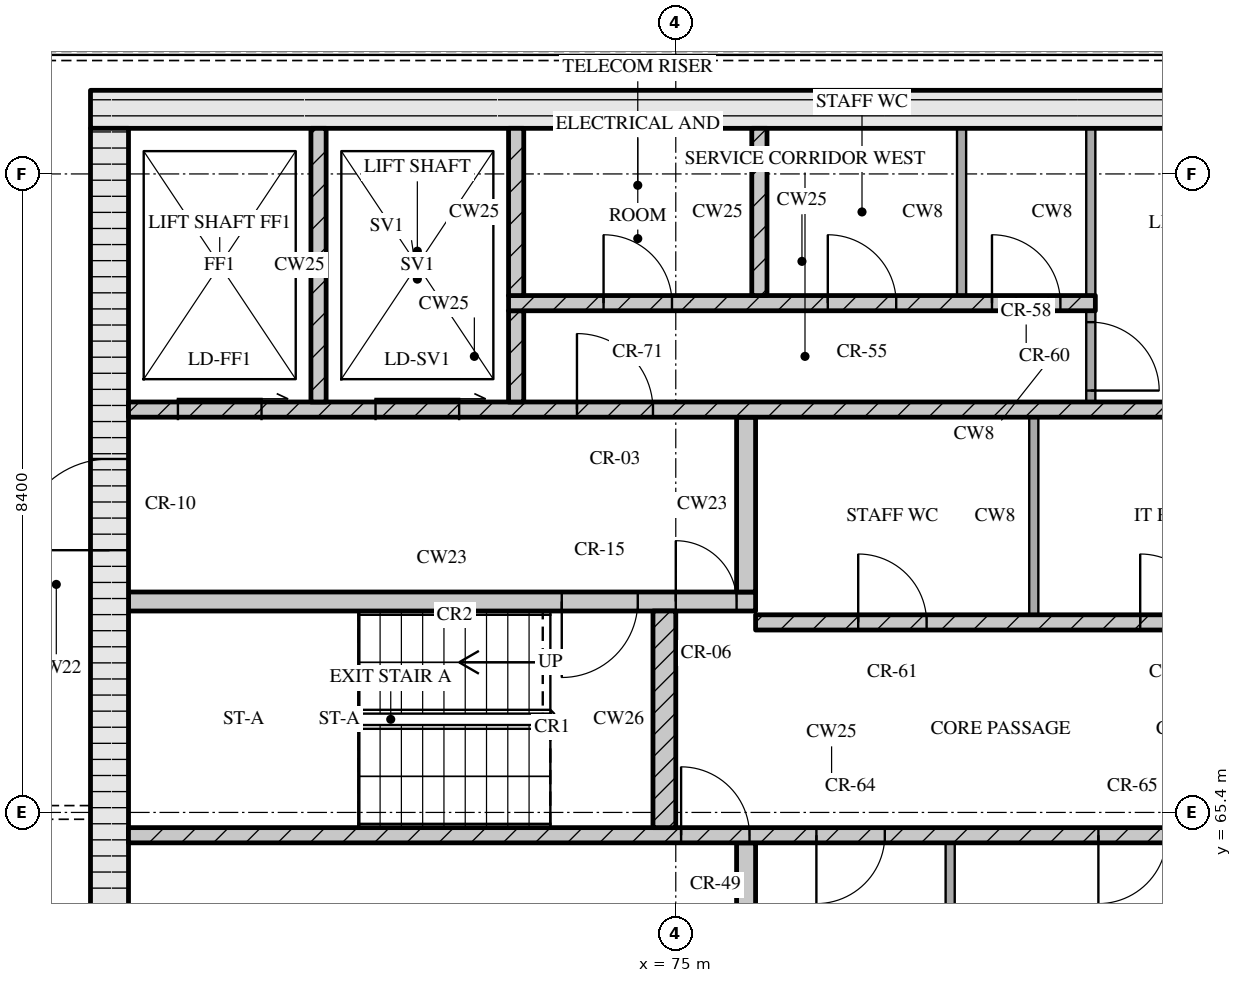
"""IFC4 building model, lengths in metres.
Left out: names, types, materials, properties, quantities, classifications, styles, units other than length and angle.
Written with IfcOpenShell. Run it as: python <this file> out.ifc"""

import sys

from ifc_helpers import new_model, si_unit, direction, frame, frame_2d, origin, place, context, subcontext, project, spatial, rectangle, extrude, element, fill, save


model = new_model("IFC4")
c1 = context("Model", 3, precision=1e-05, world=origin(), true_north=direction((0.0, 1.0)))
c2 = subcontext(c1, "Body", "Model", "MODEL_VIEW")
j1 = project(units=[si_unit("LENGTHUNIT", "METRE"), si_unit("PLANEANGLEUNIT", "RADIAN")], contexts=[c1])
p1 = place(None, origin())
s1 = spatial("IfcSite", under=j1, at=p1, CompositionType="ELEMENT")
p2 = place(p1, origin())
s2 = spatial("IfcBuilding", under=s1, at=p2, CompositionType="ELEMENT")
p3 = place(p2, frame((0.0, 0.0, 274.35)))
s3 = spatial("IfcBuildingStorey", under=s2, at=p3, CompositionType="ELEMENT", Elevation=274.35)
p4 = place(p3, frame((67.3, 74.65, 0.0), z_axis=(0.0, 0.0, 1.0), x_axis=(1.0, 0.0, 0.0)))
e1 = element("IfcWall", 1, at=p4, inside=s3, PredefinedType="SOLIDWALL", context=c2, shape_type="SweptSolid", body=[
    extrude(rectangle(XDim=40.6, YDim=0.5, at=frame_2d((20.3, 0.0))), origin(), (0.0, 0.0, 1.0), 3.32),
])
p5 = place(p3, frame((67.55, 62.4, 0.0), z_axis=(0.0, 0.0, 1.0), x_axis=(0.0, 1.0, 0.0)))
e2 = element("IfcWall", 2, at=p5, inside=s3, PredefinedType="SOLIDWALL", context=c2, shape_type="SweptSolid", body=[
    extrude(rectangle(XDim=12.0, YDim=0.5, at=frame_2d((6.0, 0.0))), origin(), (0.0, 0.0, 1.0), 3.32),
])
p6 = place(p5, frame((6.45, 0.0, 0.0)))
e3 = element("IfcOpeningElement", 3, at=p6, cuts=e2, PredefinedType="OPENING", context=c2, shape_type="SweptSolid", body=[
    extrude(rectangle(XDim=1.2, YDim=2.1, at=frame_2d((0.6, 1.05))), frame((0.0, 0.26, 0.0), z_axis=(0.0, -1.0, 0.0), x_axis=(1.0, 0.0, 0.0)), (0.0, 0.0, 1.0), 0.52),
])
p7 = place(p3, frame((75.925, 62.4, 0.0), z_axis=(0.0, 0.0, 1.0), x_axis=(0.0, 1.0, 0.0)))
e4 = element("IfcWall", 4, at=p7, inside=s3, PredefinedType="SOLIDWALL", context=c2, shape_type="SweptSolid", body=[
    extrude(rectangle(XDim=2.6, YDim=0.25, at=frame_2d((1.3, 0.0))), origin(), (0.0, 0.0, 1.0), 3.32),
])
p8 = place(p3, frame((78.61, 62.4, 0.0), z_axis=(0.0, 0.0, 1.0), x_axis=(0.0, 1.0, 0.0)))
e5 = element("IfcWall", 5, at=p8, inside=s3, PredefinedType="PARTITIONING", context=c2, shape_type="SweptSolid", body=[
    extrude(rectangle(XDim=2.6, YDim=0.12, at=frame_2d((1.3, 0.0))), origin(), (0.0, 0.0, 1.0), 3.32),
])
p9 = place(p3, frame((67.8, 65.1, 0.0), z_axis=(0.0, 0.0, 1.0), x_axis=(1.0, 0.0, 0.0)))
e6 = element("IfcWall", 6, at=p9, inside=s3, PredefinedType="SOLIDWALL", context=c2, shape_type="SweptSolid", body=[
    extrude(rectangle(XDim=18.5, YDim=0.2, at=frame_2d((9.25, 0.0))), origin(), (0.0, 0.0, 1.0), 3.32),
])
p10 = place(p9, frame((7.27, 0.0, 0.0)))
e7 = element("IfcOpeningElement", 7, at=p10, cuts=e6, PredefinedType="OPENING", context=c2, shape_type="SweptSolid", body=[
    extrude(rectangle(XDim=0.9, YDim=2.1, at=frame_2d((0.45, 1.05))), frame((0.0, 0.11, 0.0), z_axis=(0.0, -1.0, 0.0), x_axis=(1.0, 0.0, 0.0)), (0.0, 0.0, 1.0), 0.22),
])
p11 = place(p9, frame((9.05, 0.0, 0.0)))
e8 = element("IfcOpeningElement", 8, at=p11, cuts=e6, PredefinedType="OPENING", context=c2, shape_type="SweptSolid", body=[
    extrude(rectangle(XDim=0.9, YDim=2.1, at=frame_2d((0.45, 1.05))), frame((0.0, 0.11, 0.0), z_axis=(0.0, -1.0, 0.0), x_axis=(1.0, 0.0, 0.0)), (0.0, 0.0, 1.0), 0.22),
])
p12 = place(p9, frame((12.76, 0.0, 0.0)))
e9 = element("IfcOpeningElement", 9, at=p12, cuts=e6, PredefinedType="OPENING", context=c2, shape_type="SweptSolid", body=[
    extrude(rectangle(XDim=0.9, YDim=2.1, at=frame_2d((0.45, 1.05))), frame((0.0, 0.11, 0.0), z_axis=(0.0, -1.0, 0.0), x_axis=(1.0, 0.0, 0.0)), (0.0, 0.0, 1.0), 0.22),
])
p13 = place(p9, frame((16.7, 0.0, 0.0)))
e10 = element("IfcOpeningElement", 10, at=p13, cuts=e6, PredefinedType="OPENING", context=c2, shape_type="SweptSolid", body=[
    extrude(rectangle(XDim=0.9, YDim=2.1, at=frame_2d((0.45, 1.05))), frame((0.0, 0.11, 0.0), z_axis=(0.0, -1.0, 0.0), x_axis=(1.0, 0.0, 0.0)), (0.0, 0.0, 1.0), 0.22),
])
p14 = place(p3, frame((74.85, 65.2, 0.0), z_axis=(0.0, 0.0, 1.0), x_axis=(0.0, 1.0, 0.0)))
e11 = element("IfcWall", 11, at=p14, inside=s3, PredefinedType="SOLIDWALL", context=c2, shape_type="SweptSolid", body=[
    extrude(rectangle(XDim=2.85, YDim=0.3, at=frame_2d((1.425, 0.0))), origin(), (0.0, 0.0, 1.0), 3.32),
])
p15 = place(p3, frame((76.05, 67.9, 0.0), z_axis=(0.0, 0.0, 1.0), x_axis=(1.0, 0.0, 0.0)))
e12 = element("IfcWall", 12, at=p15, inside=s3, PredefinedType="SOLIDWALL", context=c2, shape_type="SweptSolid", body=[
    extrude(rectangle(XDim=23.1, YDim=0.2, at=frame_2d((11.55, 0.0))), origin(), (0.0, 0.0, 1.0), 3.32),
])
p16 = place(p15, frame((1.35, 0.0, 0.0)))
e13 = element("IfcOpeningElement", 13, at=p16, cuts=e12, PredefinedType="OPENING", context=c2, shape_type="SweptSolid", body=[
    extrude(rectangle(XDim=0.9, YDim=2.1, at=frame_2d((0.45, 1.05))), frame((0.0, 0.11, 0.0), z_axis=(0.0, -1.0, 0.0), x_axis=(1.0, 0.0, 0.0)), (0.0, 0.0, 1.0), 0.22),
])
p17 = place(p15, frame((5.06, 0.0, 0.0)))
e14 = element("IfcOpeningElement", 14, at=p17, cuts=e12, PredefinedType="OPENING", context=c2, shape_type="SweptSolid", body=[
    extrude(rectangle(XDim=0.9, YDim=2.1, at=frame_2d((0.45, 1.05))), frame((0.0, 0.11, 0.0), z_axis=(0.0, -1.0, 0.0), x_axis=(1.0, 0.0, 0.0)), (0.0, 0.0, 1.0), 0.22),
])
p18 = place(p15, frame((8.45, 0.0, 0.0)))
e15 = element("IfcOpeningElement", 15, at=p18, cuts=e12, PredefinedType="OPENING", context=c2, shape_type="SweptSolid", body=[
    extrude(rectangle(XDim=0.9, YDim=2.1, at=frame_2d((0.45, 1.05))), frame((0.0, 0.11, 0.0), z_axis=(0.0, -1.0, 0.0), x_axis=(1.0, 0.0, 0.0)), (0.0, 0.0, 1.0), 0.22),
])
p19 = place(p15, frame((10.91, 0.0, 0.0)))
e16 = element("IfcOpeningElement", 16, at=p19, cuts=e12, PredefinedType="OPENING", context=c2, shape_type="SweptSolid", body=[
    extrude(rectangle(XDim=0.9, YDim=2.1, at=frame_2d((0.45, 1.05))), frame((0.0, 0.11, 0.0), z_axis=(0.0, -1.0, 0.0), x_axis=(1.0, 0.0, 0.0)), (0.0, 0.0, 1.0), 0.22),
])
p20 = place(p15, frame((13.55, 0.0, 0.0)))
e17 = element("IfcOpeningElement", 17, at=p20, cuts=e12, PredefinedType="OPENING", context=c2, shape_type="SweptSolid", body=[
    extrude(rectangle(XDim=1.0, YDim=2.1, at=frame_2d((0.5, 1.05))), frame((0.0, 0.11, 0.0), z_axis=(0.0, -1.0, 0.0), x_axis=(1.0, 0.0, 0.0)), (0.0, 0.0, 1.0), 0.22),
])
p21 = place(p15, frame((16.2, 0.0, 0.0)))
e18 = element("IfcOpeningElement", 18, at=p21, cuts=e12, PredefinedType="OPENING", context=c2, shape_type="SweptSolid", body=[
    extrude(rectangle(XDim=1.1, YDim=2.1, at=frame_2d((0.55, 1.05))), frame((0.0, 0.11, 0.0), z_axis=(0.0, -1.0, 0.0), x_axis=(1.0, 0.0, 0.0)), (0.0, 0.0, 1.0), 0.22),
])
p22 = place(p15, frame((18.7, 0.0, 0.0)))
e19 = element("IfcOpeningElement", 19, at=p22, cuts=e12, PredefinedType="OPENING", context=c2, shape_type="SweptSolid", body=[
    extrude(rectangle(XDim=1.1, YDim=2.1, at=frame_2d((0.55, 1.05))), frame((0.0, 0.11, 0.0), z_axis=(0.0, -1.0, 0.0), x_axis=(1.0, 0.0, 0.0)), (0.0, 0.0, 1.0), 0.22),
])
p23 = place(p15, frame((21.2, 0.0, 0.0)))
e20 = element("IfcOpeningElement", 20, at=p23, cuts=e12, PredefinedType="OPENING", context=c2, shape_type="SweptSolid", body=[
    extrude(rectangle(XDim=1.1, YDim=2.1, at=frame_2d((0.55, 1.05))), frame((0.0, 0.11, 0.0), z_axis=(0.0, -1.0, 0.0), x_axis=(1.0, 0.0, 0.0)), (0.0, 0.0, 1.0), 0.22),
])
p24 = place(p3, frame((79.71, 68.0, 0.0), z_axis=(0.0, 0.0, 1.0), x_axis=(0.0, 1.0, 0.0)))
e21 = element("IfcWall", 21, at=p24, inside=s3, PredefinedType="PARTITIONING", context=c2, shape_type="SweptSolid", body=[
    extrude(rectangle(XDim=2.6, YDim=0.12, at=frame_2d((1.3, 0.0))), origin(), (0.0, 0.0, 1.0), 3.32),
])
p25 = place(p3, frame((67.8, 68.175, 0.0), z_axis=(0.0, 0.0, 1.0), x_axis=(1.0, 0.0, 0.0)))
e22 = element("IfcWall", 22, at=p25, inside=s3, PredefinedType="SOLIDWALL", context=c2, shape_type="SweptSolid", body=[
    extrude(rectangle(XDim=8.25, YDim=0.25, at=frame_2d((4.125, 0.0))), origin(), (0.0, 0.0, 1.0), 3.32),
])
p26 = place(p25, frame((5.7, 0.0, 0.0)))
e23 = element("IfcOpeningElement", 23, at=p26, cuts=e22, PredefinedType="OPENING", context=c2, shape_type="SweptSolid", body=[
    extrude(rectangle(XDim=1.0, YDim=2.1, at=frame_2d((0.5, 1.05))), frame((0.0, 0.135, 0.0), z_axis=(0.0, -1.0, 0.0), x_axis=(1.0, 0.0, 0.0)), (0.0, 0.0, 1.0), 0.27),
])
p27 = place(p25, frame((7.2, 0.0, 0.0)))
e24 = element("IfcOpeningElement", 24, at=p27, cuts=e22, PredefinedType="OPENING", context=c2, shape_type="SweptSolid", body=[
    extrude(rectangle(XDim=0.8, YDim=2.1, at=frame_2d((0.4, 1.05))), frame((0.0, 0.135, 0.0), z_axis=(0.0, -1.0, 0.0), x_axis=(1.0, 0.0, 0.0)), (0.0, 0.0, 1.0), 0.27),
])
p28 = place(p3, frame((75.925, 68.3, 0.0), z_axis=(0.0, 0.0, 1.0), x_axis=(0.0, 1.0, 0.0)))
e25 = element("IfcWall", 25, at=p28, inside=s3, PredefinedType="SOLIDWALL", context=c2, shape_type="SweptSolid", body=[
    extrude(rectangle(XDim=2.3, YDim=0.25, at=frame_2d((1.15, 0.0))), origin(), (0.0, 0.0, 1.0), 3.32),
])
p29 = place(p3, frame((67.8, 70.7, 0.0), z_axis=(0.0, 0.0, 1.0), x_axis=(1.0, 0.0, 0.0)))
e26 = element("IfcWall", 26, at=p29, inside=s3, PredefinedType="SOLIDWALL", context=c2, shape_type="SweptSolid", body=[
    extrude(rectangle(XDim=39.6, YDim=0.2, at=frame_2d((19.8, 0.0))), origin(), (0.0, 0.0, 1.0), 3.32),
])
p30 = place(p29, frame((0.65, 0.0, 0.0)))
e27 = element("IfcOpeningElement", 27, at=p30, cuts=e26, PredefinedType="OPENING", context=c2, shape_type="SweptSolid", body=[
    extrude(rectangle(XDim=1.1, YDim=2.1, at=frame_2d((0.55, 1.05))), frame((0.0, 0.11, 0.0), z_axis=(0.0, -1.0, 0.0), x_axis=(1.0, 0.0, 0.0)), (0.0, 0.0, 1.0), 0.22),
])
p31 = place(p29, frame((3.25, 0.0, 0.0)))
e28 = element("IfcOpeningElement", 28, at=p31, cuts=e26, PredefinedType="OPENING", context=c2, shape_type="SweptSolid", body=[
    extrude(rectangle(XDim=1.1, YDim=2.1, at=frame_2d((0.55, 1.05))), frame((0.0, 0.11, 0.0), z_axis=(0.0, -1.0, 0.0), x_axis=(1.0, 0.0, 0.0)), (0.0, 0.0, 1.0), 0.22),
])
p32 = place(p29, frame((5.9, 0.0, 0.0)))
e29 = element("IfcOpeningElement", 29, at=p32, cuts=e26, PredefinedType="OPENING", context=c2, shape_type="SweptSolid", body=[
    extrude(rectangle(XDim=1.0, YDim=2.1, at=frame_2d((0.5, 1.05))), frame((0.0, 0.11, 0.0), z_axis=(0.0, -1.0, 0.0), x_axis=(1.0, 0.0, 0.0)), (0.0, 0.0, 1.0), 0.22),
])
p33 = place(p29, frame((21.7, 0.0, 0.0)))
e30 = element("IfcOpeningElement", 30, at=p33, cuts=e26, PredefinedType="OPENING", context=c2, shape_type="SweptSolid", body=[
    extrude(rectangle(XDim=1.0, YDim=2.1, at=frame_2d((0.5, 1.05))), frame((0.0, 0.11, 0.0), z_axis=(0.0, -1.0, 0.0), x_axis=(1.0, 0.0, 0.0)), (0.0, 0.0, 1.0), 0.22),
])
p34 = place(p29, frame((32.7, 0.0, 0.0)))
e31 = element("IfcOpeningElement", 31, at=p34, cuts=e26, PredefinedType="OPENING", context=c2, shape_type="SweptSolid", body=[
    extrude(rectangle(XDim=1.0, YDim=2.1, at=frame_2d((0.5, 1.05))), frame((0.0, 0.11, 0.0), z_axis=(0.0, -1.0, 0.0), x_axis=(1.0, 0.0, 0.0)), (0.0, 0.0, 1.0), 0.22),
])
p35 = place(p29, frame((35.25, 0.0, 0.0)))
e32 = element("IfcOpeningElement", 32, at=p35, cuts=e26, PredefinedType="OPENING", context=c2, shape_type="SweptSolid", body=[
    extrude(rectangle(XDim=1.1, YDim=2.1, at=frame_2d((0.55, 1.05))), frame((0.0, 0.11, 0.0), z_axis=(0.0, -1.0, 0.0), x_axis=(1.0, 0.0, 0.0)), (0.0, 0.0, 1.0), 0.22),
])
p36 = place(p29, frame((37.85, 0.0, 0.0)))
e33 = element("IfcOpeningElement", 33, at=p36, cuts=e26, PredefinedType="OPENING", context=c2, shape_type="SweptSolid", body=[
    extrude(rectangle(XDim=1.1, YDim=2.1, at=frame_2d((0.55, 1.05))), frame((0.0, 0.11, 0.0), z_axis=(0.0, -1.0, 0.0), x_axis=(1.0, 0.0, 0.0)), (0.0, 0.0, 1.0), 0.22),
])
p37 = place(p3, frame((70.3, 70.8, 0.0), z_axis=(0.0, 0.0, 1.0), x_axis=(0.0, 1.0, 0.0)))
e34 = element("IfcWall", 34, at=p37, inside=s3, PredefinedType="SOLIDWALL", context=c2, shape_type="SweptSolid", body=[
    extrude(rectangle(XDim=3.6, YDim=0.2, at=frame_2d((1.8, 0.0))), origin(), (0.0, 0.0, 1.0), 3.32),
])
p38 = place(p3, frame((72.9, 70.8, 0.0), z_axis=(0.0, 0.0, 1.0), x_axis=(0.0, 1.0, 0.0)))
e35 = element("IfcWall", 35, at=p38, inside=s3, PredefinedType="SOLIDWALL", context=c2, shape_type="SweptSolid", body=[
    extrude(rectangle(XDim=1.2, YDim=0.2, at=frame_2d((0.6, 0.0))), origin(), (0.0, 0.0, 1.0), 3.32),
])
p39 = place(p3, frame((80.46, 70.8, 0.0), z_axis=(0.0, 0.0, 1.0), x_axis=(0.0, 1.0, 0.0)))
e36 = element("IfcWall", 36, at=p39, inside=s3, PredefinedType="PARTITIONING", context=c2, shape_type="SweptSolid", body=[
    extrude(rectangle(XDim=1.2, YDim=0.12, at=frame_2d((0.6, 0.0))), origin(), (0.0, 0.0, 1.0), 3.32),
])
p40 = place(p39, frame((0.15, 0.0, 0.0)))
e37 = element("IfcOpeningElement", 37, at=p40, cuts=e36, PredefinedType="OPENING", context=c2, shape_type="SweptSolid", body=[
    extrude(rectangle(XDim=0.9, YDim=2.1, at=frame_2d((0.45, 1.05))), frame((0.0, 0.07, 0.0), z_axis=(0.0, -1.0, 0.0), x_axis=(1.0, 0.0, 0.0)), (0.0, 0.0, 1.0), 0.14),
])
p41 = place(p3, frame((72.8, 72.1, 0.0), z_axis=(0.0, 0.0, 1.0), x_axis=(1.0, 0.0, 0.0)))
e38 = element("IfcWall", 38, at=p41, inside=s3, PredefinedType="SOLIDWALL", context=c2, shape_type="SweptSolid", body=[
    extrude(rectangle(XDim=7.72, YDim=0.2, at=frame_2d((3.86, 0.0))), origin(), (0.0, 0.0, 1.0), 3.32),
])
p42 = place(p41, frame((1.25, 0.0, 0.0)))
e39 = element("IfcOpeningElement", 39, at=p42, cuts=e38, PredefinedType="OPENING", context=c2, shape_type="SweptSolid", body=[
    extrude(rectangle(XDim=0.9, YDim=2.1, at=frame_2d((0.45, 1.05))), frame((0.0, 0.11, 0.0), z_axis=(0.0, -1.0, 0.0), x_axis=(1.0, 0.0, 0.0)), (0.0, 0.0, 1.0), 0.22),
])
p43 = place(p41, frame((4.2, 0.0, 0.0)))
e40 = element("IfcOpeningElement", 40, at=p43, cuts=e38, PredefinedType="OPENING", context=c2, shape_type="SweptSolid", body=[
    extrude(rectangle(XDim=0.9, YDim=2.1, at=frame_2d((0.45, 1.05))), frame((0.0, 0.11, 0.0), z_axis=(0.0, -1.0, 0.0), x_axis=(1.0, 0.0, 0.0)), (0.0, 0.0, 1.0), 0.22),
])
p44 = place(p41, frame((6.36, 0.0, 0.0)))
e41 = element("IfcOpeningElement", 41, at=p44, cuts=e38, PredefinedType="OPENING", context=c2, shape_type="SweptSolid", body=[
    extrude(rectangle(XDim=0.9, YDim=2.1, at=frame_2d((0.45, 1.05))), frame((0.0, 0.11, 0.0), z_axis=(0.0, -1.0, 0.0), x_axis=(1.0, 0.0, 0.0)), (0.0, 0.0, 1.0), 0.22),
])
for number, where, z_axis, x_axis in (
    (42, (72.9, 72.2, 0.0), (0.0, 0.0, 1.0), (0.0, 1.0, 0.0)),
    (43, (76.1, 72.2, 0.0), (0.0, 0.0, 1.0), (0.0, 1.0, 0.0)),
):
    element("IfcWall", number, at=place(p3, frame(where, z_axis=z_axis, x_axis=x_axis)), inside=s3, PredefinedType="SOLIDWALL", context=c2, shape_type="SweptSolid", body=[
        extrude(rectangle(XDim=2.2, YDim=0.2, at=frame_2d((1.1, 0.0))), origin(), (0.0, 0.0, 1.0), 3.32),
    ])
for number, where, z_axis, x_axis in (
    (44, (78.76, 72.2, 0.0), (0.0, 0.0, 1.0), (0.0, 1.0, 0.0)),
    (45, (80.46, 72.2, 0.0), (0.0, 0.0, 1.0), (0.0, 1.0, 0.0)),
):
    element("IfcWall", number, at=place(p3, frame(where, z_axis=z_axis, x_axis=x_axis)), inside=s3, PredefinedType="PARTITIONING", context=c2, shape_type="SweptSolid", body=[
        extrude(rectangle(XDim=2.2, YDim=0.12, at=frame_2d((1.1, 0.0))), origin(), (0.0, 0.0, 1.0), 3.32),
    ])
p45 = place(p10, origin())
e46 = element("IfcDoor", 46, at=p45, inside=s3, OperationType="SINGLE_SWING_LEFT", PredefinedType="DOOR", context=c2, shape_type="SweptSolid", body=[
    extrude(rectangle(XDim=0.9, YDim=2.1, at=frame_2d((0.45, 1.05))), frame((0.0, 0.025, 0.0), z_axis=(0.0, -1.0, 0.0), x_axis=(1.0, 0.0, 0.0)), (0.0, 0.0, 1.0), 0.05),
])
fill(e7, e46)
p46 = place(p11, origin())
e47 = element("IfcDoor", 47, at=p46, inside=s3, OperationType="SINGLE_SWING_RIGHT", PredefinedType="DOOR", context=c2, shape_type="SweptSolid", body=[
    extrude(rectangle(XDim=0.9, YDim=2.1, at=frame_2d((0.45, 1.05))), frame((0.0, 0.025, 0.0), z_axis=(0.0, -1.0, 0.0), x_axis=(1.0, 0.0, 0.0)), (0.0, 0.0, 1.0), 0.05),
])
fill(e8, e47)
p47 = place(p12, origin())
e48 = element("IfcDoor", 48, at=p47, inside=s3, OperationType="SINGLE_SWING_RIGHT", PredefinedType="DOOR", context=c2, shape_type="SweptSolid", body=[
    extrude(rectangle(XDim=0.9, YDim=2.1, at=frame_2d((0.45, 1.05))), frame((0.0, 0.025, 0.0), z_axis=(0.0, -1.0, 0.0), x_axis=(1.0, 0.0, 0.0)), (0.0, 0.0, 1.0), 0.05),
])
fill(e9, e48)
p48 = place(p16, origin())
e49 = element("IfcDoor", 49, at=p48, inside=s3, OperationType="SINGLE_SWING_LEFT", PredefinedType="DOOR", context=c2, shape_type="SweptSolid", body=[
    extrude(rectangle(XDim=0.9, YDim=2.1, at=frame_2d((0.45, 1.05))), frame((0.0, 0.025, 0.0), z_axis=(0.0, -1.0, 0.0), x_axis=(1.0, 0.0, 0.0)), (0.0, 0.0, 1.0), 0.05),
])
fill(e13, e49)
p49 = place(p17, origin())
e50 = element("IfcDoor", 50, at=p49, inside=s3, OperationType="SINGLE_SWING_LEFT", PredefinedType="DOOR", context=c2, shape_type="SweptSolid", body=[
    extrude(rectangle(XDim=0.9, YDim=2.1, at=frame_2d((0.45, 1.05))), frame((0.0, 0.025, 0.0), z_axis=(0.0, -1.0, 0.0), x_axis=(1.0, 0.0, 0.0)), (0.0, 0.0, 1.0), 0.05),
])
fill(e14, e50)
p50 = place(p26, origin())
e51 = element("IfcDoor", 51, at=p50, inside=s3, OperationType="SINGLE_SWING_RIGHT", PredefinedType="DOOR", context=c2, shape_type="SweptSolid", body=[
    extrude(rectangle(XDim=1.0, YDim=2.1, at=frame_2d((0.5, 1.05))), frame((0.0, 0.025, 0.0), z_axis=(0.0, -1.0, 0.0), x_axis=(1.0, 0.0, 0.0)), (0.0, 0.0, 1.0), 0.05),
])
fill(e23, e51)
p51 = place(p27, origin())
e52 = element("IfcDoor", 52, at=p51, inside=s3, OperationType="SINGLE_SWING_LEFT", PredefinedType="DOOR", context=c2, shape_type="SweptSolid", body=[
    extrude(rectangle(XDim=0.8, YDim=2.1, at=frame_2d((0.4, 1.05))), frame((0.0, 0.025, 0.0), z_axis=(0.0, -1.0, 0.0), x_axis=(1.0, 0.0, 0.0)), (0.0, 0.0, 1.0), 0.05),
])
fill(e24, e52)
p52 = place(p6, origin())
e53 = element("IfcDoor", 53, at=p52, inside=s3, OperationType="SINGLE_SWING_LEFT", PredefinedType="DOOR", context=c2, shape_type="SweptSolid", body=[
    extrude(rectangle(XDim=1.2, YDim=2.1, at=frame_2d((0.6, 1.05))), frame((0.0, 0.025, 0.0), z_axis=(0.0, -1.0, 0.0), x_axis=(1.0, 0.0, 0.0)), (0.0, 0.0, 1.0), 0.05),
])
fill(e3, e53)
p53 = place(p30, origin())
e54 = element("IfcDoor", 54, at=p53, inside=s3, OperationType="SLIDING_TO_RIGHT", PredefinedType="DOOR", context=c2, shape_type="SweptSolid", body=[
    extrude(rectangle(XDim=1.1, YDim=2.1, at=frame_2d((0.55, 1.05))), frame((0.0, 0.025, 0.0), z_axis=(0.0, -1.0, 0.0), x_axis=(1.0, 0.0, 0.0)), (0.0, 0.0, 1.0), 0.05),
])
fill(e27, e54)
p54 = place(p31, origin())
e55 = element("IfcDoor", 55, at=p54, inside=s3, OperationType="SLIDING_TO_RIGHT", PredefinedType="DOOR", context=c2, shape_type="SweptSolid", body=[
    extrude(rectangle(XDim=1.1, YDim=2.1, at=frame_2d((0.55, 1.05))), frame((0.0, 0.025, 0.0), z_axis=(0.0, -1.0, 0.0), x_axis=(1.0, 0.0, 0.0)), (0.0, 0.0, 1.0), 0.05),
])
fill(e28, e55)
p55 = place(p32, origin())
e56 = element("IfcDoor", 56, at=p55, inside=s3, OperationType="SINGLE_SWING_LEFT", PredefinedType="DOOR", context=c2, shape_type="SweptSolid", body=[
    extrude(rectangle(XDim=1.0, YDim=2.1, at=frame_2d((0.5, 1.05))), frame((0.0, 0.025, 0.0), z_axis=(0.0, -1.0, 0.0), x_axis=(1.0, 0.0, 0.0)), (0.0, 0.0, 1.0), 0.05),
])
fill(e29, e56)
p56 = place(p40, origin())
e57 = element("IfcDoor", 57, at=p56, inside=s3, OperationType="SINGLE_SWING_RIGHT", PredefinedType="DOOR", context=c2, shape_type="SweptSolid", body=[
    extrude(rectangle(XDim=0.9, YDim=2.1, at=frame_2d((0.45, 1.05))), frame((0.0, 0.025, 0.0), z_axis=(0.0, -1.0, 0.0), x_axis=(1.0, 0.0, 0.0)), (0.0, 0.0, 1.0), 0.05),
])
fill(e37, e57)
p57 = place(p42, origin())
e58 = element("IfcDoor", 58, at=p57, inside=s3, OperationType="SINGLE_SWING_LEFT", PredefinedType="DOOR", context=c2, shape_type="SweptSolid", body=[
    extrude(rectangle(XDim=0.9, YDim=2.1, at=frame_2d((0.45, 1.05))), frame((0.0, 0.025, 0.0), z_axis=(0.0, -1.0, 0.0), x_axis=(1.0, 0.0, 0.0)), (0.0, 0.0, 1.0), 0.05),
])
fill(e39, e58)
p58 = place(p43, origin())
e59 = element("IfcDoor", 59, at=p58, inside=s3, OperationType="SINGLE_SWING_LEFT", PredefinedType="DOOR", context=c2, shape_type="SweptSolid", body=[
    extrude(rectangle(XDim=0.9, YDim=2.1, at=frame_2d((0.45, 1.05))), frame((0.0, 0.025, 0.0), z_axis=(0.0, -1.0, 0.0), x_axis=(1.0, 0.0, 0.0)), (0.0, 0.0, 1.0), 0.05),
])
fill(e40, e59)
p59 = place(p44, origin())
e60 = element("IfcDoor", 60, at=p59, inside=s3, OperationType="SINGLE_SWING_LEFT", PredefinedType="DOOR", context=c2, shape_type="SweptSolid", body=[
    extrude(rectangle(XDim=0.9, YDim=2.1, at=frame_2d((0.45, 1.05))), frame((0.0, 0.025, 0.0), z_axis=(0.0, -1.0, 0.0), x_axis=(1.0, 0.0, 0.0)), (0.0, 0.0, 1.0), 0.05),
])
fill(e41, e60)
save(model, sys.argv[1])
